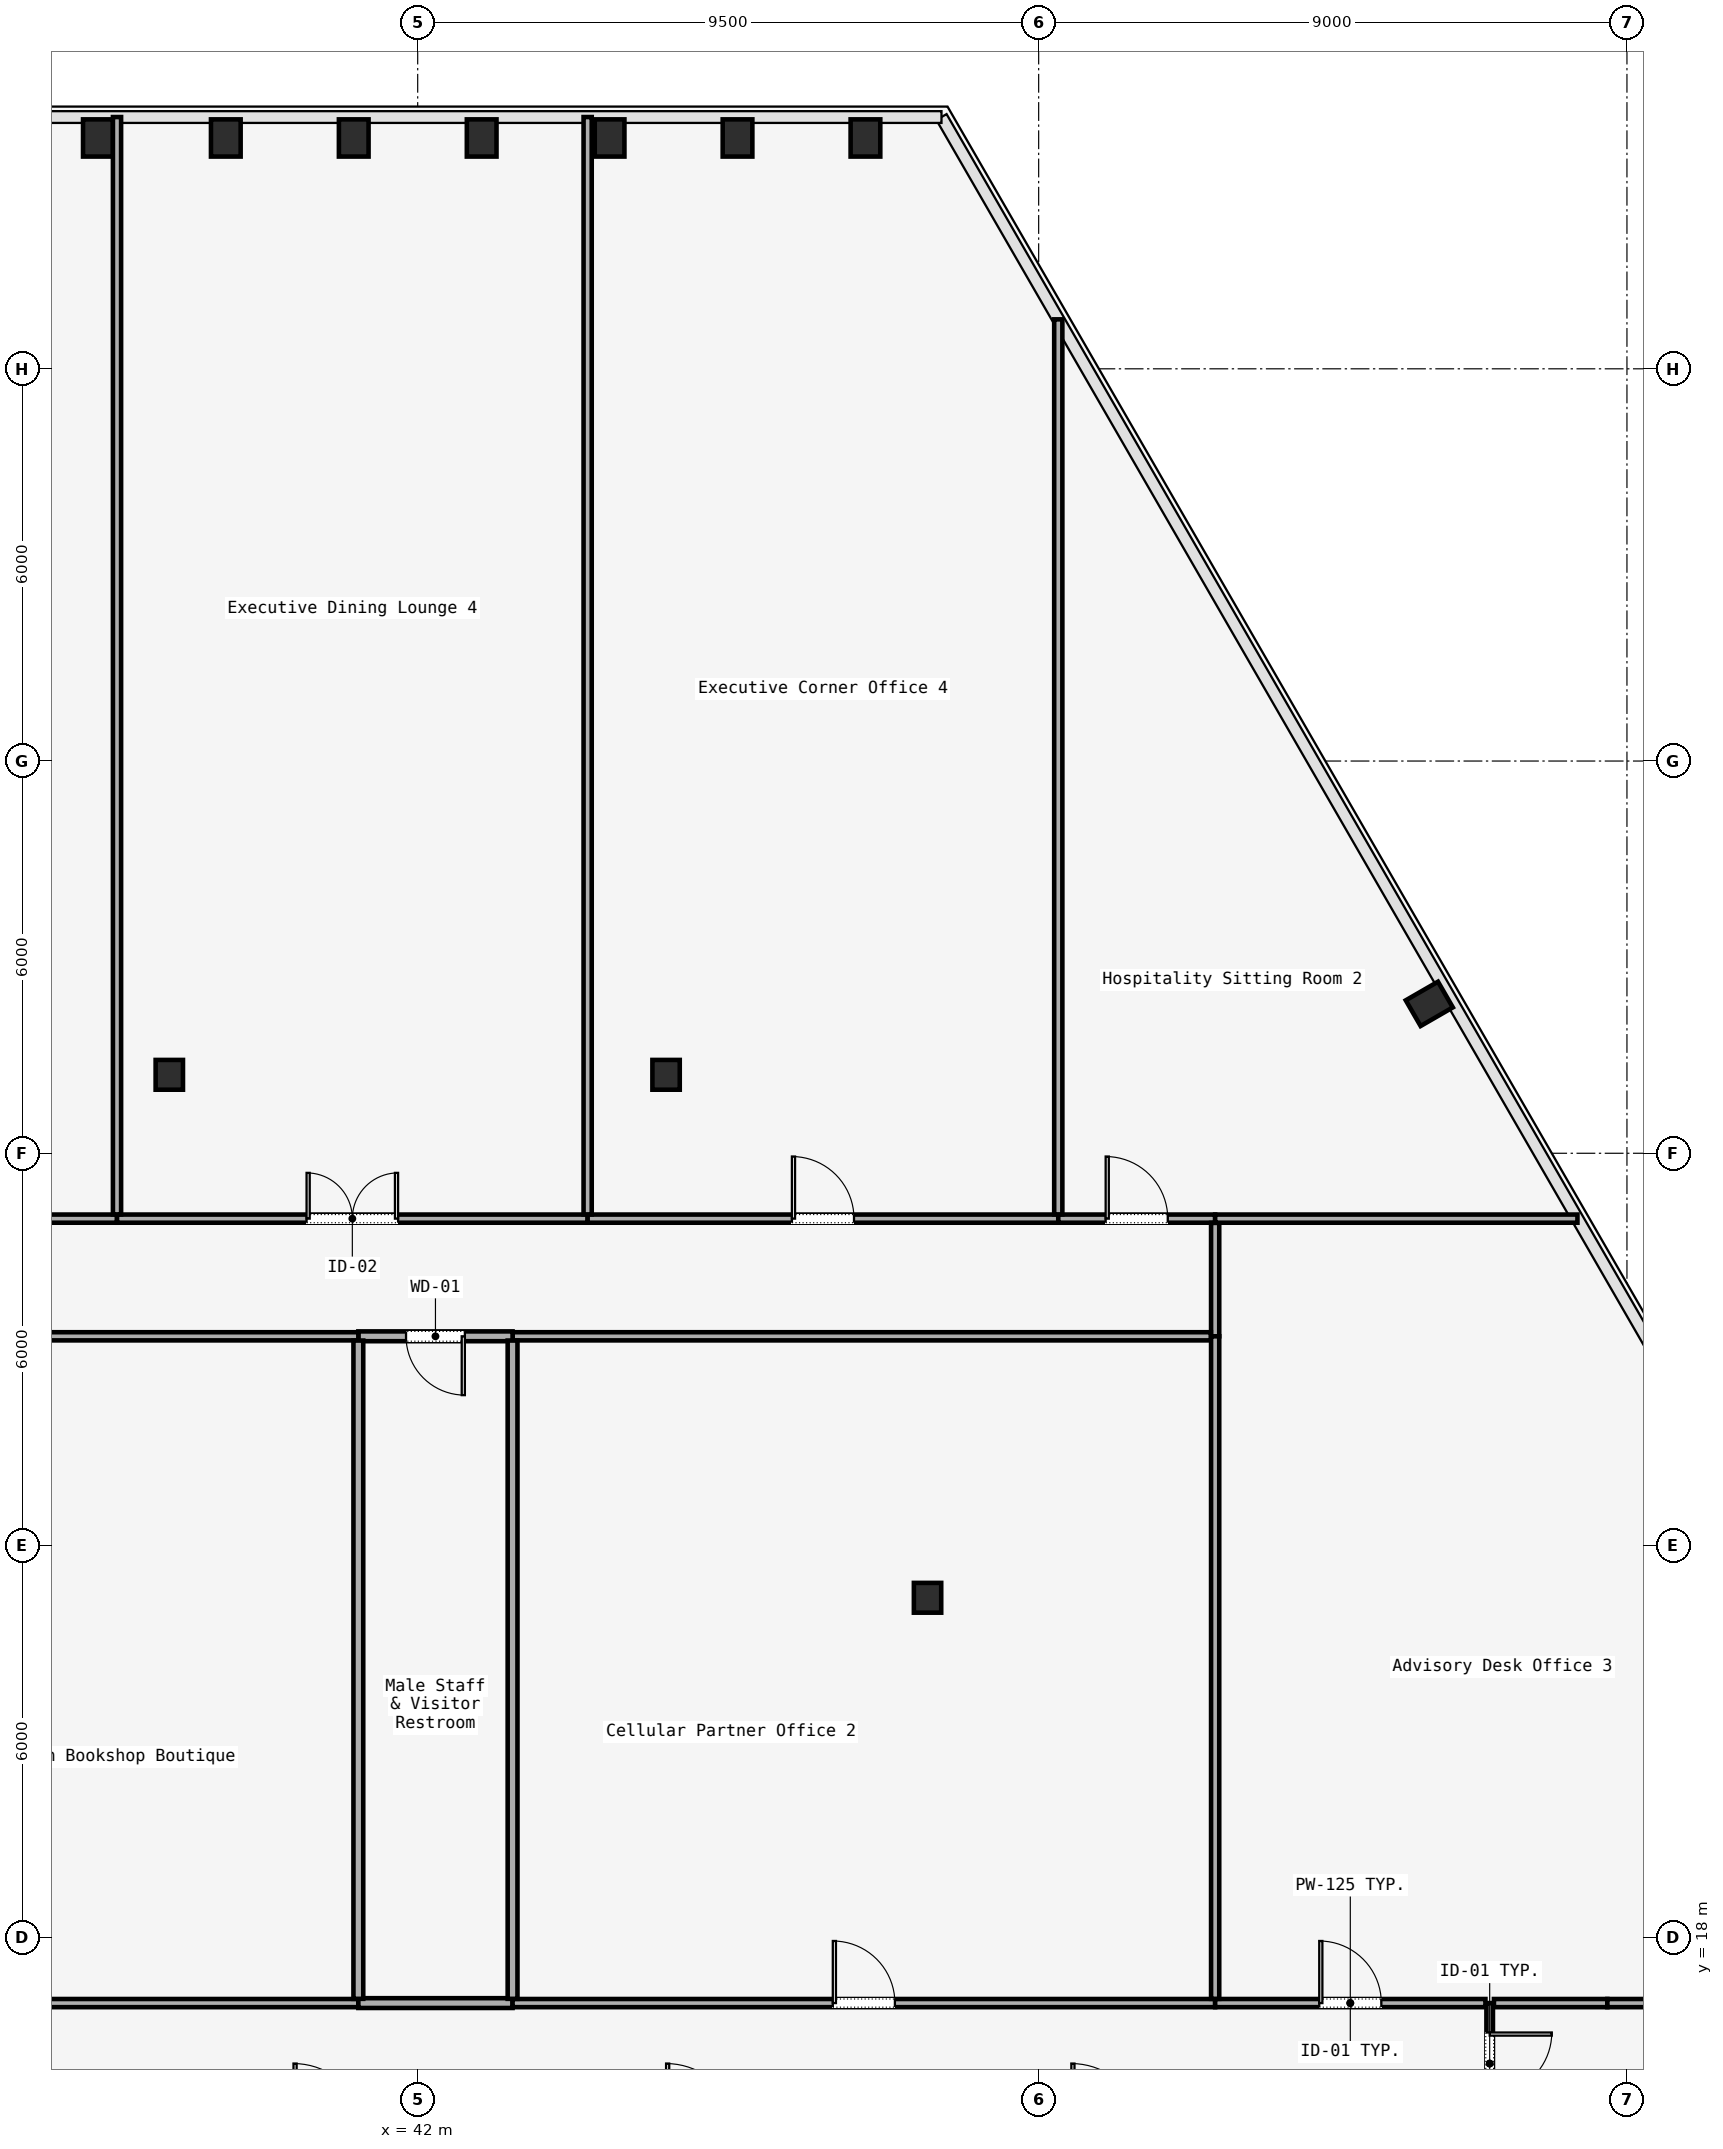
"""IFC4 building model, lengths in metres.
Left out: names, types, materials, properties, quantities, classifications, styles, units other than length and angle.
Written with IfcOpenShell. Run it as: python <this file> out.ifc"""

import sys

from ifc_helpers import new_model, si_unit, direction, frame, frame_2d, origin, origin_2d, place, context, subcontext, project, spatial, rectangle, i_section, extrude, element, fill, save


model = new_model("IFC4")
c1 = context("Model", 3, precision=1e-05, world=origin(), true_north=direction((0.0, 1.0)))
c2 = subcontext(c1, "Body", "Model", "MODEL_VIEW")
j1 = project(units=[si_unit("LENGTHUNIT", "METRE"), si_unit("PLANEANGLEUNIT", "RADIAN")], contexts=[c1])
p1 = place(None, origin())
s1 = spatial("IfcSite", under=j1, at=p1, CompositionType="ELEMENT")
p2 = place(p1, origin())
s2 = spatial("IfcBuilding", under=s1, at=p2, CompositionType="ELEMENT")
p3 = place(p2, frame((0.0, 0.0, 55.0)))
s3 = spatial("IfcBuildingStorey", under=s2, at=p3, CompositionType="ELEMENT", Elevation=55.0)
for number, where, z_axis, x_axis in (
    (1, (49.8, 23.2, 0.0), (0.0, 0.0, 1.0), (1.0, 0.0, 0.0)),
    (2, (38.2, 31.2, 0.0), (0.0, 0.0, 1.0), (1.0, 0.0, 0.0)),
    (3, (45.8, 31.2, 0.0), (0.0, 0.0, 1.0), (1.0, 0.0, 0.0)),
):
    element("IfcColumn", number, at=place(p3, frame(where, z_axis=z_axis, x_axis=x_axis)), inside=s3, PredefinedType="COLUMN", context=c2, shape_type="SweptSolid", body=[
        extrude(i_section(OverallWidth=0.418, OverallDepth=0.456, WebThickness=0.042, FlangeThickness=0.067, FilletRadius=0.015, at=origin_2d()), origin(), (0.0, 0.0, 1.0), 3.58),
    ])
p4 = place(p3, frame((57.476, 32.285, 0.0), z_axis=(-0.03618442168, -0.062574563807, 0.99738413442), x_axis=(-0.00045136117, 0.99803864152, 0.06259925164)))
e4 = element("IfcColumn", 4, at=p4, inside=s3, PredefinedType="COLUMN", context=c2, shape_type="SweptSolid", body=[
    extrude(i_section(OverallWidth=0.454, OverallDepth=0.569, WebThickness=0.078, FlangeThickness=0.08, FilletRadius=0.015, at=origin_2d()), origin(), (0.0, 0.0, 1.0), 3.589),
])
p5 = place(p3, frame((48.85, 45.531, 0.0), z_axis=(-0.06275112158, -0.001020896772, 0.998028684212), x_axis=(0.01626682787, -0.999867686402, 0.0)))
e5 = element("IfcColumn", 5, at=p5, inside=s3, PredefinedType="COLUMN", context=c2, shape_type="SweptSolid", body=[
    extrude(i_section(OverallWidth=0.454, OverallDepth=0.569, WebThickness=0.078, FlangeThickness=0.08, FilletRadius=0.015, at=origin_2d()), origin(), (0.0, 0.0, 1.0), 3.587),
])
p6 = place(p3, frame((46.893, 45.531, 0.0), z_axis=(-0.044826665385, -0.001021884469, 0.998994257152), x_axis=(0.022790431559, -0.999740264383, 0.0)))
e6 = element("IfcColumn", 6, at=p6, inside=s3, PredefinedType="COLUMN", context=c2, shape_type="SweptSolid", body=[
    extrude(i_section(OverallWidth=0.454, OverallDepth=0.569, WebThickness=0.078, FlangeThickness=0.08, FilletRadius=0.015, at=origin_2d()), origin(), (0.0, 0.0, 1.0), 3.584),
])
p7 = place(p3, frame((44.936, 45.531, 0.0), z_axis=(-0.026926934543, -0.001022541818, 0.999636881375), x_axis=(0.037947331922, -0.999279740613, 0.0)))
e7 = element("IfcColumn", 7, at=p7, inside=s3, PredefinedType="COLUMN", context=c2, shape_type="SweptSolid", body=[
    extrude(i_section(OverallWidth=0.454, OverallDepth=0.569, WebThickness=0.078, FlangeThickness=0.08, FilletRadius=0.015, at=origin_2d()), origin(), (0.0, 0.0, 1.0), 3.581),
])
for number, where, z_axis, x_axis in (
    (8, (42.979, 45.531, 0.0), (-0.009, -0.001, 1.0), (0.113, -0.994, 0.0)),
    (9, (41.021, 45.531, 0.0), (0.009, -0.001, 1.0), (0.113, 0.994, 0.0)),
):
    element("IfcColumn", number, at=place(p3, frame(where, z_axis=z_axis, x_axis=x_axis)), inside=s3, PredefinedType="COLUMN", context=c2, shape_type="SweptSolid", body=[
        extrude(i_section(OverallWidth=0.454, OverallDepth=0.569, WebThickness=0.078, FlangeThickness=0.08, FilletRadius=0.015, at=origin_2d()), origin(), (0.0, 0.0, 1.0), 3.58),
    ])
p8 = place(p3, frame((39.064, 45.531, 0.0), z_axis=(0.026926934543, -0.001022541818, 0.999636881375), x_axis=(0.037947331922, 0.999279740613, 0.0)))
e10 = element("IfcColumn", 10, at=p8, inside=s3, PredefinedType="COLUMN", context=c2, shape_type="SweptSolid", body=[
    extrude(i_section(OverallWidth=0.454, OverallDepth=0.569, WebThickness=0.078, FlangeThickness=0.08, FilletRadius=0.015, at=origin_2d()), origin(), (0.0, 0.0, 1.0), 3.581),
])
p9 = place(p3, frame((37.107, 45.531, 0.0), z_axis=(0.044826665385, -0.001021884469, 0.998994257152), x_axis=(0.022790431559, 0.999740264383, 0.0)))
e11 = element("IfcColumn", 11, at=p9, inside=s3, PredefinedType="COLUMN", context=c2, shape_type="SweptSolid", body=[
    extrude(i_section(OverallWidth=0.454, OverallDepth=0.569, WebThickness=0.078, FlangeThickness=0.08, FilletRadius=0.015, at=origin_2d()), origin(), (0.0, 0.0, 1.0), 3.584),
])
p10 = place(p3, frame((58.4, 17.0, 0.0), z_axis=(0.0, 0.0, 1.0), x_axis=(0.0, -1.0, 0.0)))
e12 = element("IfcWall", 12, at=p10, inside=s3, PredefinedType="MOVABLE", context=c2, shape_type="SweptSolid", body=[
    extrude(rectangle(XDim=1.85, YDim=0.1, at=frame_2d((0.925, 0.0))), origin(), (0.0, 0.0, 1.0), 2.933),
])
p11 = place(p10, frame((0.45, 0.0, 0.0)))
e13 = element("IfcOpeningElement", 13, at=p11, cuts=e12, PredefinedType="OPENING", context=c2, shape_type="SweptSolid", body=[
    extrude(rectangle(XDim=0.95, YDim=2.2, at=frame_2d((0.475, 1.1))), frame((0.0, 0.05, 0.0), z_axis=(0.0, -1.0, 0.0), x_axis=(1.0, 0.0, 0.0)), (0.0, 0.0, 1.0), 0.1),
])
p12 = place(p3, frame((31.6, 29.0, 0.0), z_axis=(0.0, 0.0, 1.0), x_axis=(1.0, 0.0, 0.0)))
e14 = element("IfcWall", 14, at=p12, inside=s3, PredefinedType="PARTITIONING", context=c2, shape_type="SweptSolid", body=[
    extrude(rectangle(XDim=5.8, YDim=0.125, at=frame_2d((2.9, 0.0))), origin(), (0.0, 0.0, 1.0), 2.933),
])
p13 = place(p12, frame((2.425, 0.0, 0.0)))
e15 = element("IfcOpeningElement", 15, at=p13, cuts=e14, PredefinedType="OPENING", context=c2, shape_type="SweptSolid", body=[
    extrude(rectangle(XDim=0.95, YDim=2.2, at=frame_2d((0.475, 1.1))), frame((0.0, 0.062, 0.0), z_axis=(0.0, -1.0, 0.0), x_axis=(1.0, 0.0, 0.0)), (0.0, 0.0, 1.0), 0.125),
])
p14 = place(p3, frame((37.4, 29.0, 0.0), z_axis=(0.0, 0.0, 1.0), x_axis=(1.0, 0.0, 0.0)))
e16 = element("IfcWall", 16, at=p14, inside=s3, PredefinedType="PARTITIONING", context=c2, shape_type="SweptSolid", body=[
    extrude(rectangle(XDim=7.2, YDim=0.125, at=frame_2d((3.6, 0.0))), origin(), (0.0, 0.0, 1.0), 2.933),
])
p15 = place(p14, frame((2.9, 0.0, 0.0)))
e17 = element("IfcOpeningElement", 17, at=p15, cuts=e16, PredefinedType="OPENING", context=c2, shape_type="SweptSolid", body=[
    extrude(rectangle(XDim=1.4, YDim=2.2, at=frame_2d((0.7, 1.1))), frame((0.0, 0.062, 0.0), z_axis=(0.0, -1.0, 0.0), x_axis=(1.0, 0.0, 0.0)), (0.0, 0.0, 1.0), 0.125),
])
p16 = place(p3, frame((44.6, 29.0, 0.0), z_axis=(0.0, 0.0, 1.0), x_axis=(1.0, 0.0, 0.0)))
e18 = element("IfcWall", 18, at=p16, inside=s3, PredefinedType="PARTITIONING", context=c2, shape_type="SweptSolid", body=[
    extrude(rectangle(XDim=7.2, YDim=0.125, at=frame_2d((3.6, 0.0))), origin(), (0.0, 0.0, 1.0), 2.933),
])
p17 = place(p16, frame((3.125, 0.0, 0.0)))
e19 = element("IfcOpeningElement", 19, at=p17, cuts=e18, PredefinedType="OPENING", context=c2, shape_type="SweptSolid", body=[
    extrude(rectangle(XDim=0.95, YDim=2.2, at=frame_2d((0.475, 1.1))), frame((0.0, 0.062, 0.0), z_axis=(0.0, -1.0, 0.0), x_axis=(1.0, 0.0, 0.0)), (0.0, 0.0, 1.0), 0.125),
])
p18 = place(p3, frame((51.8, 29.0, 0.0), z_axis=(0.0, 0.0, 1.0), x_axis=(1.0, 0.0, 0.0)))
e20 = element("IfcWall", 20, at=p18, inside=s3, PredefinedType="PARTITIONING", context=c2, shape_type="SweptSolid", body=[
    extrude(rectangle(XDim=2.4, YDim=0.125, at=frame_2d((1.2, 0.0))), origin(), (0.0, 0.0, 1.0), 2.933),
])
p19 = place(p18, frame((0.725, 0.0, 0.0)))
e21 = element("IfcOpeningElement", 21, at=p19, cuts=e20, PredefinedType="OPENING", context=c2, shape_type="SweptSolid", body=[
    extrude(rectangle(XDim=0.95, YDim=2.2, at=frame_2d((0.475, 1.1))), frame((0.0, 0.062, 0.0), z_axis=(0.0, -1.0, 0.0), x_axis=(1.0, 0.0, 0.0)), (0.0, 0.0, 1.0), 0.125),
])
p20 = place(p3, frame((54.2, 28.935, 0.0), z_axis=(0.0, 0.0, 1.0), x_axis=(0.0, -1.0, 0.0)))
e22 = element("IfcWall", 22, at=p20, inside=s3, PredefinedType="PARTITIONING", context=c2, shape_type="SweptSolid", body=[
    extrude(rectangle(XDim=1.735, YDim=0.125, at=frame_2d((0.868, 0.0))), origin(), (0.0, 0.0, 1.0), 2.933),
])
p21 = place(p3, frame((54.135, 27.2, 0.0), z_axis=(0.0, 0.0, 1.0), x_axis=(-1.0, 0.0, 0.0)))
e23 = element("IfcWall", 23, at=p21, inside=s3, PredefinedType="PARTITIONING", context=c2, shape_type="SweptSolid", body=[
    extrude(rectangle(XDim=10.684, YDim=0.125, at=frame_2d((5.342, 0.0))), origin(), (0.0, 0.0, 1.0), 2.933),
])
p22 = place(p3, frame((43.451, 27.2, 0.0), z_axis=(0.0, 0.0, 1.0), x_axis=(-1.0, 0.0, 0.0)))
e24 = element("IfcWall", 24, at=p22, inside=s3, PredefinedType="PARTITIONING", context=c2, shape_type="SweptSolid", body=[
    extrude(rectangle(XDim=2.359, YDim=0.15, at=frame_2d((1.18, 0.0))), origin(), (0.0, 0.0, 1.0), 2.933),
])
p23 = place(p22, frame((0.73, 0.0, 0.0)))
e25 = element("IfcOpeningElement", 25, at=p23, cuts=e24, PredefinedType="OPENING", context=c2, shape_type="SweptSolid", body=[
    extrude(rectangle(XDim=0.9, YDim=2.15, at=frame_2d((0.45, 1.075))), frame((0.0, 0.075, 0.0), z_axis=(0.0, -1.0, 0.0), x_axis=(1.0, 0.0, 0.0)), (0.0, 0.0, 1.0), 0.15),
])
p24 = place(p3, frame((41.092, 27.2, 0.0), z_axis=(0.0, 0.0, 1.0), x_axis=(-1.0, 0.0, 0.0)))
e26 = element("IfcWall", 26, at=p24, inside=s3, PredefinedType="PARTITIONING", context=c2, shape_type="SweptSolid", body=[
    extrude(rectangle(XDim=9.492, YDim=0.125, at=frame_2d((4.746, 0.0))), origin(), (0.0, 0.0, 1.0), 2.933),
])
p25 = place(p3, frame((31.665, 17.0, 0.0), z_axis=(0.0, 0.0, 1.0), x_axis=(1.0, 0.0, 0.0)))
e27 = element("IfcWall", 27, at=p25, inside=s3, PredefinedType="PARTITIONING", context=c2, shape_type="SweptSolid", body=[
    extrude(rectangle(XDim=9.427, YDim=0.125, at=frame_2d((4.713, 0.0))), origin(), (0.0, 0.0, 1.0), 2.933),
])
p26 = place(p3, frame((41.092, 17.0, 0.0), z_axis=(0.0, 0.0, 1.0), x_axis=(1.0, 0.0, 0.0)))
e28 = element("IfcWall", 28, at=p26, inside=s3, PredefinedType="PARTITIONING", context=c2, shape_type="SweptSolid", body=[
    extrude(rectangle(XDim=2.359, YDim=0.15, at=frame_2d((1.18, 0.0))), origin(), (0.0, 0.0, 1.0), 2.933),
])
p27 = place(p3, frame((43.451, 17.0, 0.0), z_axis=(0.0, 0.0, 1.0), x_axis=(1.0, 0.0, 0.0)))
e29 = element("IfcWall", 29, at=p27, inside=s3, PredefinedType="PARTITIONING", context=c2, shape_type="SweptSolid", body=[
    extrude(rectangle(XDim=10.749, YDim=0.125, at=frame_2d((5.374, 0.0))), origin(), (0.0, 0.0, 1.0), 2.933),
])
p28 = place(p27, frame((4.899, 0.0, 0.0)))
e30 = element("IfcOpeningElement", 30, at=p28, cuts=e29, PredefinedType="OPENING", context=c2, shape_type="SweptSolid", body=[
    extrude(rectangle(XDim=0.95, YDim=2.2, at=frame_2d((0.475, 1.1))), frame((0.0, 0.062, 0.0), z_axis=(0.0, -1.0, 0.0), x_axis=(1.0, 0.0, 0.0)), (0.0, 0.0, 1.0), 0.125),
])
p29 = place(p3, frame((54.2, 17.0, 0.0), z_axis=(0.0, 0.0, 1.0), x_axis=(1.0, 0.0, 0.0)))
e31 = element("IfcWall", 31, at=p29, inside=s3, PredefinedType="PARTITIONING", context=c2, shape_type="SweptSolid", body=[
    extrude(rectangle(XDim=4.135, YDim=0.125, at=frame_2d((2.067, 0.0))), origin(), (0.0, 0.0, 1.0), 2.933),
])
p30 = place(p29, frame((1.593, 0.0, 0.0)))
e32 = element("IfcOpeningElement", 32, at=p30, cuts=e31, PredefinedType="OPENING", context=c2, shape_type="SweptSolid", body=[
    extrude(rectangle(XDim=0.95, YDim=2.2, at=frame_2d((0.475, 1.1))), frame((0.0, 0.062, 0.0), z_axis=(0.0, -1.0, 0.0), x_axis=(1.0, 0.0, 0.0)), (0.0, 0.0, 1.0), 0.125),
])
p31 = place(p3, frame((58.465, 17.0, 0.0), z_axis=(0.0, 0.0, 1.0), x_axis=(1.0, 0.0, 0.0)))
e33 = element("IfcWall", 33, at=p31, inside=s3, PredefinedType="PARTITIONING", context=c2, shape_type="SweptSolid", body=[
    extrude(rectangle(XDim=1.735, YDim=0.125, at=frame_2d((0.867, 0.0))), origin(), (0.0, 0.0, 1.0), 2.933),
])
p32 = place(p3, frame((60.2, 17.0, 0.0), z_axis=(0.0, 0.0, 1.0), x_axis=(1.0, 0.0, 0.0)))
e34 = element("IfcWall", 34, at=p32, inside=s3, PredefinedType="PARTITIONING", context=c2, shape_type="SweptSolid", body=[
    extrude(rectangle(XDim=4.116, YDim=0.125, at=frame_2d((2.058, 0.0))), origin(), (0.0, 0.0, 1.0), 2.933),
])
for number, where, z_axis, x_axis in (
    (35, (41.092, 27.135, 0.0), (0.0, 0.0, 1.0), (0.0, -1.0, 0.0)),
    (36, (43.451, 27.135, 0.0), (0.0, 0.0, 1.0), (0.0, -1.0, 0.0)),
):
    element("IfcWall", number, at=place(p3, frame(where, z_axis=z_axis, x_axis=x_axis)), inside=s3, PredefinedType="PARTITIONING", context=c2, shape_type="SweptSolid", body=[
        extrude(rectangle(XDim=10.07, YDim=0.15, at=frame_2d((5.035, 0.0))), origin(), (0.0, 0.0, 1.0), 2.933),
    ])
p33 = place(p3, frame((54.2, 27.2, 0.0), z_axis=(0.0, 0.0, 1.0), x_axis=(0.0, -1.0, 0.0)))
e37 = element("IfcWall", 37, at=p33, inside=s3, PredefinedType="PARTITIONING", context=c2, shape_type="SweptSolid", body=[
    extrude(rectangle(XDim=10.135, YDim=0.125, at=frame_2d((5.067, 0.0))), origin(), (0.0, 0.0, 1.0), 2.933),
])
p34 = place(p3, frame((54.2, 29.0, 0.0), z_axis=(0.0, 0.0, 1.0), x_axis=(1.0, 0.0, 0.0)))
e38 = element("IfcWall", 38, at=p34, inside=s3, PredefinedType="PARTITIONING", context=c2, shape_type="SweptSolid", body=[
    extrude(rectangle(XDim=5.542, YDim=0.125, at=frame_2d((2.771, 0.0))), origin(), (0.0, 0.0, 1.0), 2.933),
])
p35 = place(p3, frame((51.8, 29.065, 0.0), z_axis=(0.0, 0.0, 1.0), x_axis=(0.0, 1.0, 0.0)))
e39 = element("IfcWall", 39, at=p35, inside=s3, PredefinedType="PARTITIONING", context=c2, shape_type="SweptSolid", body=[
    extrude(rectangle(XDim=13.692, YDim=0.125, at=frame_2d((6.846, 0.0))), origin(), (0.0, 0.0, 1.0), 2.933),
])
for number, where, z_axis, x_axis in (
    (40, (37.4, 45.851, 0.0), (0.0, 0.0, 1.0), (0.0, -1.0, 0.0)),
    (41, (44.6, 29.065, 0.0), (0.0, 0.0, 1.0), (0.0, 1.0, 0.0)),
):
    element("IfcWall", number, at=place(p3, frame(where, z_axis=z_axis, x_axis=x_axis)), inside=s3, PredefinedType="PARTITIONING", context=c2, shape_type="SweptSolid", body=[
        extrude(rectangle(XDim=16.786, YDim=0.125, at=frame_2d((8.393, 0.0))), origin(), (0.0, 0.0, 1.0), 2.933),
    ])
p36 = place(p11, origin())
e42 = element("IfcDoor", 42, at=p36, inside=s3, OperationType="SINGLE_SWING_LEFT", PredefinedType="DOOR", context=c2, shape_type="SweptSolid", body=[
    extrude(rectangle(XDim=0.95, YDim=2.2, at=frame_2d((0.475, 1.1))), frame((0.0, 0.025, 0.0), z_axis=(0.0, -1.0, 0.0), x_axis=(1.0, 0.0, 0.0)), (0.0, 0.0, 1.0), 0.05),
])
fill(e13, e42)
p37 = place(p23, origin())
e43 = element("IfcDoor", 43, at=p37, inside=s3, OperationType="SINGLE_SWING_RIGHT", PredefinedType="DOOR", context=c2, shape_type="SweptSolid", body=[
    extrude(rectangle(XDim=0.9, YDim=2.15, at=frame_2d((0.45, 1.075))), frame((0.0, 0.025, 0.0), z_axis=(0.0, -1.0, 0.0), x_axis=(1.0, 0.0, 0.0)), (0.0, 0.0, 1.0), 0.05),
])
fill(e25, e43)
p38 = place(p28, origin())
e44 = element("IfcDoor", 44, at=p38, inside=s3, OperationType="SINGLE_SWING_LEFT", PredefinedType="DOOR", context=c2, shape_type="SweptSolid", body=[
    extrude(rectangle(XDim=0.95, YDim=2.2, at=frame_2d((0.475, 1.1))), frame((0.0, 0.025, 0.0), z_axis=(0.0, -1.0, 0.0), x_axis=(1.0, 0.0, 0.0)), (0.0, 0.0, 1.0), 0.05),
])
fill(e30, e44)
p39 = place(p30, origin())
e45 = element("IfcDoor", 45, at=p39, inside=s3, OperationType="SINGLE_SWING_RIGHT", PredefinedType="DOOR", context=c2, shape_type="SweptSolid", body=[
    extrude(rectangle(XDim=0.95, YDim=2.2, at=frame_2d((0.475, 1.1))), frame((0.0, 0.025, 0.0), z_axis=(0.0, -1.0, 0.0), x_axis=(1.0, 0.0, 0.0)), (0.0, 0.0, 1.0), 0.05),
])
fill(e32, e45)
p40 = place(p19, origin())
e46 = element("IfcDoor", 46, at=p40, inside=s3, OperationType="SINGLE_SWING_RIGHT", PredefinedType="DOOR", context=c2, shape_type="SweptSolid", body=[
    extrude(rectangle(XDim=0.95, YDim=2.2, at=frame_2d((0.475, 1.1))), frame((0.0, 0.025, 0.0), z_axis=(0.0, -1.0, 0.0), x_axis=(1.0, 0.0, 0.0)), (0.0, 0.0, 1.0), 0.05),
])
fill(e21, e46)
p41 = place(p17, origin())
e47 = element("IfcDoor", 47, at=p41, inside=s3, OperationType="SINGLE_SWING_RIGHT", PredefinedType="DOOR", context=c2, shape_type="SweptSolid", body=[
    extrude(rectangle(XDim=0.95, YDim=2.2, at=frame_2d((0.475, 1.1))), frame((0.0, 0.025, 0.0), z_axis=(0.0, -1.0, 0.0), x_axis=(1.0, 0.0, 0.0)), (0.0, 0.0, 1.0), 0.05),
])
fill(e19, e47)
p42 = place(p15, origin())
e48 = element("IfcDoor", 48, at=p42, inside=s3, OperationType="SINGLE_SWING_LEFT", PredefinedType="DOOR", context=c2, shape_type="SweptSolid", body=[
    extrude(rectangle(XDim=1.4, YDim=2.2, at=frame_2d((0.7, 1.1))), frame((0.0, 0.025, 0.0), z_axis=(0.0, -1.0, 0.0), x_axis=(1.0, 0.0, 0.0)), (0.0, 0.0, 1.0), 0.05),
])
fill(e17, e48)
save(model, sys.argv[1])
